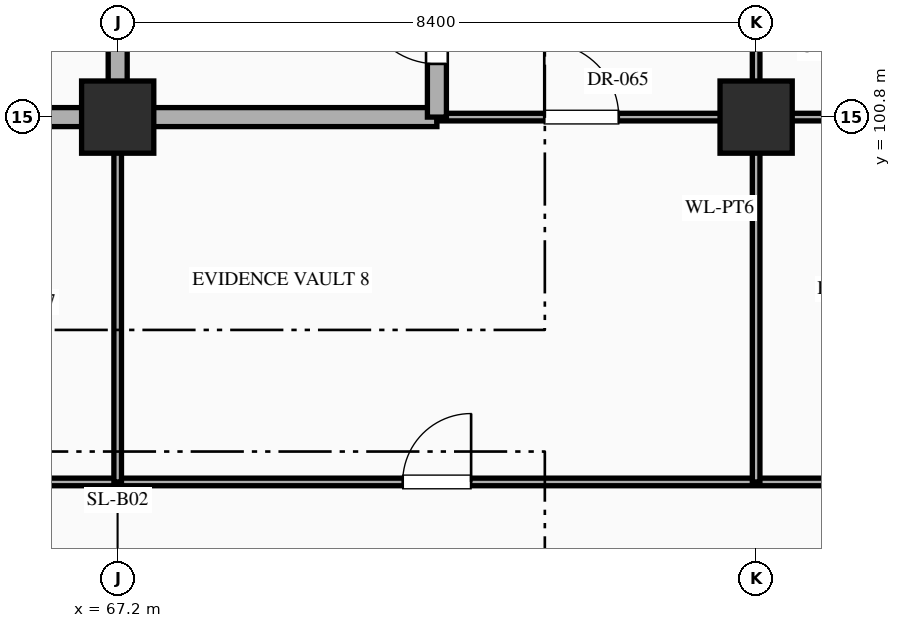
"""IFC4 building model, lengths in metres.
Left out: names, types, materials, properties, quantities, classifications, styles, units other than length and angle.
Written with IfcOpenShell. Run it as: python <this file> out.ifc"""

import sys

from ifc_helpers import new_model, si_unit, direction, frame, frame_2d, origin, origin_2d, place, context, subcontext, project, spatial, rectangle, extrude, element, fill, save


model = new_model("IFC4")
c1 = context("Model", 3, precision=1e-05, world=origin(), true_north=direction((0.0, 1.0)))
c2 = subcontext(c1, "Body", "Model", "MODEL_VIEW")
j1 = project(units=[si_unit("LENGTHUNIT", "METRE"), si_unit("PLANEANGLEUNIT", "RADIAN")], contexts=[c1])
p1 = place(None, origin())
s1 = spatial("IfcSite", under=j1, at=p1, CompositionType="ELEMENT")
p2 = place(p1, origin())
s2 = spatial("IfcBuilding", under=s1, at=p2, CompositionType="ELEMENT")
p3 = place(p2, frame((0.0, 0.0, -10.2)))
s3 = spatial("IfcBuildingStorey", under=s2, at=p3, CompositionType="ELEMENT", Elevation=-10.2)
for number, where, z_axis, x_axis in (
    (1, (67.2, 100.8, 0.0), (0.0, 0.0, 1.0), (1.0, 0.0, 0.0)),
    (2, (75.6, 100.8, 0.0), (0.0, 0.0, 1.0), (1.0, 0.0, 0.0)),
):
    element("IfcColumn", number, at=place(p3, frame(where, z_axis=z_axis, x_axis=x_axis)), inside=s3, PredefinedType="COLUMN", context=c2, shape_type="SweptSolid", body=[
        extrude(rectangle(XDim=0.95, YDim=0.95, at=origin_2d()), origin(), (0.0, 0.0, 1.0), 4.8),
    ])
p4 = place(p3, frame((0.04, 96.0, 0.0), z_axis=(0.0, 0.0, 1.0), x_axis=(1.0, 0.0, 0.0)))
e3 = element("IfcWall", 3, at=p4, inside=s3, PredefinedType="STANDARD", context=c2, shape_type="SweptSolid", body=[
    extrude(rectangle(XDim=151.16, YDim=0.1, at=frame_2d((75.58, 0.0))), origin(), (0.0, 0.0, 1.0), 4.48),
])
p5 = place(p4, frame((1.04, 0.0, 0.0)))
e4 = element("IfcOpeningElement", 4, at=p5, cuts=e3, PredefinedType="OPENING", context=c2, shape_type="SweptSolid", body=[
    extrude(rectangle(XDim=1.28, YDim=2.35, at=frame_2d((0.64, 1.175))), frame((0.0, 0.062, 0.0), z_axis=(0.0, -1.0, 0.0), x_axis=(1.0, 0.0, 0.0)), (0.0, 0.0, 1.0), 0.124),
])
p6 = place(p4, frame((4.09, 0.0, 0.0)))
e5 = element("IfcOpeningElement", 5, at=p6, cuts=e3, PredefinedType="OPENING", context=c2, shape_type="SweptSolid", body=[
    extrude(rectangle(XDim=0.94, YDim=2.3, at=frame_2d((0.47, 1.15))), frame((0.0, 0.062, 0.0), z_axis=(0.0, -1.0, 0.0), x_axis=(1.0, 0.0, 0.0)), (0.0, 0.0, 1.0), 0.124),
])
p7 = place(p4, frame((6.57, 0.0, 0.0)))
e6 = element("IfcOpeningElement", 6, at=p7, cuts=e3, PredefinedType="OPENING", context=c2, shape_type="SweptSolid", body=[
    extrude(rectangle(XDim=0.98, YDim=2.35, at=frame_2d((0.49, 1.175))), frame((0.0, 0.062, 0.0), z_axis=(0.0, -1.0, 0.0), x_axis=(1.0, 0.0, 0.0)), (0.0, 0.0, 1.0), 0.124),
])
p8 = place(p4, frame((12.05, 0.0, 0.0)))
e7 = element("IfcOpeningElement", 7, at=p8, cuts=e3, PredefinedType="OPENING", context=c2, shape_type="SweptSolid", body=[
    extrude(rectangle(XDim=1.02, YDim=2.4, at=frame_2d((0.51, 1.2))), frame((0.0, 0.062, 0.0), z_axis=(0.0, -1.0, 0.0), x_axis=(1.0, 0.0, 0.0)), (0.0, 0.0, 1.0), 0.124),
])
p9 = place(p4, frame((20.43, 0.0, 0.0)))
e8 = element("IfcOpeningElement", 8, at=p9, cuts=e3, PredefinedType="OPENING", context=c2, shape_type="SweptSolid", body=[
    extrude(rectangle(XDim=1.06, YDim=2.4, at=frame_2d((0.53, 1.2))), frame((0.0, 0.062, 0.0), z_axis=(0.0, -1.0, 0.0), x_axis=(1.0, 0.0, 0.0)), (0.0, 0.0, 1.0), 0.124),
])
p10 = place(p4, frame((26.29, 0.0, 0.0)))
e9 = element("IfcOpeningElement", 9, at=p10, cuts=e3, PredefinedType="OPENING", context=c2, shape_type="SweptSolid", body=[
    extrude(rectangle(XDim=1.14, YDim=2.4, at=frame_2d((0.57, 1.2))), frame((0.0, 0.062, 0.0), z_axis=(0.0, -1.0, 0.0), x_axis=(1.0, 0.0, 0.0)), (0.0, 0.0, 1.0), 0.124),
])
p11 = place(p4, frame((29.31, 0.0, 0.0)))
e10 = element("IfcOpeningElement", 10, at=p11, cuts=e3, PredefinedType="OPENING", context=c2, shape_type="SweptSolid", body=[
    extrude(rectangle(XDim=0.9, YDim=2.15, at=frame_2d((0.45, 1.075))), frame((0.0, 0.062, 0.0), z_axis=(0.0, -1.0, 0.0), x_axis=(1.0, 0.0, 0.0)), (0.0, 0.0, 1.0), 0.124),
])
p12 = place(p4, frame((31.83, 0.0, 0.0)))
e11 = element("IfcOpeningElement", 11, at=p12, cuts=e3, PredefinedType="OPENING", context=c2, shape_type="SweptSolid", body=[
    extrude(rectangle(XDim=0.86, YDim=2.1, at=frame_2d((0.43, 1.05))), frame((0.0, 0.062, 0.0), z_axis=(0.0, -1.0, 0.0), x_axis=(1.0, 0.0, 0.0)), (0.0, 0.0, 1.0), 0.124),
])
p13 = place(p4, frame((37.3, 0.0, 0.0)))
e12 = element("IfcOpeningElement", 12, at=p13, cuts=e3, PredefinedType="OPENING", context=c2, shape_type="SweptSolid", body=[
    extrude(rectangle(XDim=0.92, YDim=2.15, at=frame_2d((0.46, 1.075))), frame((0.0, 0.062, 0.0), z_axis=(0.0, -1.0, 0.0), x_axis=(1.0, 0.0, 0.0)), (0.0, 0.0, 1.0), 0.124),
])
p14 = place(p4, frame((45.68, 0.0, 0.0)))
e13 = element("IfcOpeningElement", 13, at=p14, cuts=e3, PredefinedType="OPENING", context=c2, shape_type="SweptSolid", body=[
    extrude(rectangle(XDim=0.96, YDim=2.2, at=frame_2d((0.48, 1.1))), frame((0.0, 0.062, 0.0), z_axis=(0.0, -1.0, 0.0), x_axis=(1.0, 0.0, 0.0)), (0.0, 0.0, 1.0), 0.124),
])
p15 = place(p4, frame((51.57, 0.0, 0.0)))
e14 = element("IfcOpeningElement", 14, at=p15, cuts=e3, PredefinedType="OPENING", context=c2, shape_type="SweptSolid", body=[
    extrude(rectangle(XDim=0.98, YDim=2.35, at=frame_2d((0.49, 1.175))), frame((0.0, 0.062, 0.0), z_axis=(0.0, -1.0, 0.0), x_axis=(1.0, 0.0, 0.0)), (0.0, 0.0, 1.0), 0.124),
])
p16 = place(p4, frame((54.45, 0.0, 0.0)))
e15 = element("IfcOpeningElement", 15, at=p16, cuts=e3, PredefinedType="OPENING", context=c2, shape_type="SweptSolid", body=[
    extrude(rectangle(XDim=1.02, YDim=2.4, at=frame_2d((0.51, 1.2))), frame((0.0, 0.062, 0.0), z_axis=(0.0, -1.0, 0.0), x_axis=(1.0, 0.0, 0.0)), (0.0, 0.0, 1.0), 0.124),
])
p17 = place(p4, frame((56.93, 0.0, 0.0)))
e16 = element("IfcOpeningElement", 16, at=p17, cuts=e3, PredefinedType="OPENING", context=c2, shape_type="SweptSolid", body=[
    extrude(rectangle(XDim=1.06, YDim=2.4, at=frame_2d((0.53, 1.2))), frame((0.0, 0.062, 0.0), z_axis=(0.0, -1.0, 0.0), x_axis=(1.0, 0.0, 0.0)), (0.0, 0.0, 1.0), 0.124),
])
p18 = place(p4, frame((62.39, 0.0, 0.0)))
e17 = element("IfcOpeningElement", 17, at=p18, cuts=e3, PredefinedType="OPENING", context=c2, shape_type="SweptSolid", body=[
    extrude(rectangle(XDim=1.14, YDim=2.4, at=frame_2d((0.57, 1.2))), frame((0.0, 0.062, 0.0), z_axis=(0.0, -1.0, 0.0), x_axis=(1.0, 0.0, 0.0)), (0.0, 0.0, 1.0), 0.124),
])
p19 = place(p4, frame((70.91, 0.0, 0.0)))
e18 = element("IfcOpeningElement", 18, at=p19, cuts=e3, PredefinedType="OPENING", context=c2, shape_type="SweptSolid", body=[
    extrude(rectangle(XDim=0.9, YDim=2.15, at=frame_2d((0.45, 1.075))), frame((0.0, 0.062, 0.0), z_axis=(0.0, -1.0, 0.0), x_axis=(1.0, 0.0, 0.0)), (0.0, 0.0, 1.0), 0.124),
])
p20 = place(p4, frame((79.33, 0.0, 0.0)))
e19 = element("IfcOpeningElement", 19, at=p20, cuts=e3, PredefinedType="OPENING", context=c2, shape_type="SweptSolid", body=[
    extrude(rectangle(XDim=0.86, YDim=2.1, at=frame_2d((0.43, 1.05))), frame((0.0, 0.062, 0.0), z_axis=(0.0, -1.0, 0.0), x_axis=(1.0, 0.0, 0.0)), (0.0, 0.0, 1.0), 0.124),
])
p21 = place(p4, frame((85.1, 0.0, 0.0)))
e20 = element("IfcOpeningElement", 20, at=p21, cuts=e3, PredefinedType="OPENING", context=c2, shape_type="SweptSolid", body=[
    extrude(rectangle(XDim=1.12, YDim=2.25, at=frame_2d((0.56, 1.125))), frame((0.0, 0.062, 0.0), z_axis=(0.0, -1.0, 0.0), x_axis=(1.0, 0.0, 0.0)), (0.0, 0.0, 1.0), 0.124),
])
p22 = place(p4, frame((87.98, 0.0, 0.0)))
e21 = element("IfcOpeningElement", 21, at=p22, cuts=e3, PredefinedType="OPENING", context=c2, shape_type="SweptSolid", body=[
    extrude(rectangle(XDim=1.16, YDim=2.3, at=frame_2d((0.58, 1.15))), frame((0.0, 0.062, 0.0), z_axis=(0.0, -1.0, 0.0), x_axis=(1.0, 0.0, 0.0)), (0.0, 0.0, 1.0), 0.124),
])
p23 = place(p4, frame((90.46, 0.0, 0.0)))
e22 = element("IfcOpeningElement", 22, at=p23, cuts=e3, PredefinedType="OPENING", context=c2, shape_type="SweptSolid", body=[
    extrude(rectangle(XDim=1.2, YDim=2.35, at=frame_2d((0.6, 1.175))), frame((0.0, 0.062, 0.0), z_axis=(0.0, -1.0, 0.0), x_axis=(1.0, 0.0, 0.0)), (0.0, 0.0, 1.0), 0.124),
])
p24 = place(p4, frame((95.94, 0.0, 0.0)))
e23 = element("IfcOpeningElement", 23, at=p24, cuts=e3, PredefinedType="OPENING", context=c2, shape_type="SweptSolid", body=[
    extrude(rectangle(XDim=1.24, YDim=2.3, at=frame_2d((0.62, 1.15))), frame((0.0, 0.062, 0.0), z_axis=(0.0, -1.0, 0.0), x_axis=(1.0, 0.0, 0.0)), (0.0, 0.0, 1.0), 0.124),
])
p25 = place(p4, frame((104.32, 0.0, 0.0)))
e24 = element("IfcOpeningElement", 24, at=p25, cuts=e3, PredefinedType="OPENING", context=c2, shape_type="SweptSolid", body=[
    extrude(rectangle(XDim=1.28, YDim=2.35, at=frame_2d((0.64, 1.175))), frame((0.0, 0.062, 0.0), z_axis=(0.0, -1.0, 0.0), x_axis=(1.0, 0.0, 0.0)), (0.0, 0.0, 1.0), 0.124),
])
p26 = place(p4, frame((110.39, 0.0, 0.0)))
e25 = element("IfcOpeningElement", 25, at=p26, cuts=e3, PredefinedType="OPENING", context=c2, shape_type="SweptSolid", body=[
    extrude(rectangle(XDim=0.94, YDim=2.3, at=frame_2d((0.47, 1.15))), frame((0.0, 0.062, 0.0), z_axis=(0.0, -1.0, 0.0), x_axis=(1.0, 0.0, 0.0)), (0.0, 0.0, 1.0), 0.124),
])
p27 = place(p4, frame((113.27, 0.0, 0.0)))
e26 = element("IfcOpeningElement", 26, at=p27, cuts=e3, PredefinedType="OPENING", context=c2, shape_type="SweptSolid", body=[
    extrude(rectangle(XDim=0.98, YDim=2.35, at=frame_2d((0.49, 1.175))), frame((0.0, 0.062, 0.0), z_axis=(0.0, -1.0, 0.0), x_axis=(1.0, 0.0, 0.0)), (0.0, 0.0, 1.0), 0.124),
])
p28 = place(p4, frame((115.75, 0.0, 0.0)))
e27 = element("IfcOpeningElement", 27, at=p28, cuts=e3, PredefinedType="OPENING", context=c2, shape_type="SweptSolid", body=[
    extrude(rectangle(XDim=1.02, YDim=2.4, at=frame_2d((0.51, 1.2))), frame((0.0, 0.062, 0.0), z_axis=(0.0, -1.0, 0.0), x_axis=(1.0, 0.0, 0.0)), (0.0, 0.0, 1.0), 0.124),
])
p29 = place(p4, frame((121.24, 0.0, 0.0)))
e28 = element("IfcOpeningElement", 28, at=p29, cuts=e3, PredefinedType="OPENING", context=c2, shape_type="SweptSolid", body=[
    extrude(rectangle(XDim=1.04, YDim=2.2, at=frame_2d((0.52, 1.1))), frame((0.0, 0.062, 0.0), z_axis=(0.0, -1.0, 0.0), x_axis=(1.0, 0.0, 0.0)), (0.0, 0.0, 1.0), 0.124),
])
p30 = place(p4, frame((129.62, 0.0, 0.0)))
e29 = element("IfcOpeningElement", 29, at=p30, cuts=e3, PredefinedType="OPENING", context=c2, shape_type="SweptSolid", body=[
    extrude(rectangle(XDim=1.08, YDim=2.25, at=frame_2d((0.54, 1.125))), frame((0.0, 0.062, 0.0), z_axis=(0.0, -1.0, 0.0), x_axis=(1.0, 0.0, 0.0)), (0.0, 0.0, 1.0), 0.124),
])
p31 = place(p4, frame((135.5, 0.0, 0.0)))
e30 = element("IfcOpeningElement", 30, at=p31, cuts=e3, PredefinedType="OPENING", context=c2, shape_type="SweptSolid", body=[
    extrude(rectangle(XDim=1.12, YDim=2.25, at=frame_2d((0.56, 1.125))), frame((0.0, 0.062, 0.0), z_axis=(0.0, -1.0, 0.0), x_axis=(1.0, 0.0, 0.0)), (0.0, 0.0, 1.0), 0.124),
])
p32 = place(p4, frame((138.38, 0.0, 0.0)))
e31 = element("IfcOpeningElement", 31, at=p32, cuts=e3, PredefinedType="OPENING", context=c2, shape_type="SweptSolid", body=[
    extrude(rectangle(XDim=1.16, YDim=2.3, at=frame_2d((0.58, 1.15))), frame((0.0, 0.062, 0.0), z_axis=(0.0, -1.0, 0.0), x_axis=(1.0, 0.0, 0.0)), (0.0, 0.0, 1.0), 0.124),
])
p33 = place(p4, frame((140.86, 0.0, 0.0)))
e32 = element("IfcOpeningElement", 32, at=p33, cuts=e3, PredefinedType="OPENING", context=c2, shape_type="SweptSolid", body=[
    extrude(rectangle(XDim=1.2, YDim=2.35, at=frame_2d((0.6, 1.175))), frame((0.0, 0.062, 0.0), z_axis=(0.0, -1.0, 0.0), x_axis=(1.0, 0.0, 0.0)), (0.0, 0.0, 1.0), 0.124),
])
p34 = place(p4, frame((146.34, 0.0, 0.0)))
e33 = element("IfcOpeningElement", 33, at=p34, cuts=e3, PredefinedType="OPENING", context=c2, shape_type="SweptSolid", body=[
    extrude(rectangle(XDim=1.24, YDim=2.3, at=frame_2d((0.62, 1.15))), frame((0.0, 0.062, 0.0), z_axis=(0.0, -1.0, 0.0), x_axis=(1.0, 0.0, 0.0)), (0.0, 0.0, 1.0), 0.124),
])
p35 = place(p3, frame((58.8, 100.8, 0.0), z_axis=(0.0, 0.0, 1.0), x_axis=(1.0, 0.0, 0.0)))
e34 = element("IfcWall", 34, at=p35, inside=s3, PredefinedType="STANDARD", context=c2, shape_type="SweptSolid", body=[
    extrude(rectangle(XDim=12.6, YDim=0.25, at=frame_2d((6.3, 0.0))), origin(), (0.0, 0.0, 1.0), 3.63),
])
p36 = place(p35, frame((3.7, 0.0, 0.0)))
e35 = element("IfcOpeningElement", 35, at=p36, cuts=e34, PredefinedType="OPENING", context=c2, shape_type="SweptSolid", body=[
    extrude(rectangle(XDim=1.0, YDim=2.2, at=frame_2d((0.5, 1.1))), frame((0.0, 0.137, 0.0), z_axis=(0.0, -1.0, 0.0), x_axis=(1.0, 0.0, 0.0)), (0.0, 0.0, 1.0), 0.274),
])
p37 = place(p3, frame((71.4, 100.8, 0.0), z_axis=(0.0, 0.0, 1.0), x_axis=(1.0, 0.0, 0.0)))
e36 = element("IfcWall", 36, at=p37, inside=s3, PredefinedType="STANDARD", context=c2, shape_type="SweptSolid", body=[
    extrude(rectangle(XDim=25.2, YDim=0.1, at=frame_2d((12.6, 0.0))), origin(), (0.0, 0.0, 1.0), 3.63),
])
p38 = place(p37, frame((1.413, 0.0, 0.0)))
e37 = element("IfcOpeningElement", 37, at=p38, cuts=e36, PredefinedType="OPENING", context=c2, shape_type="SweptSolid", body=[
    extrude(rectangle(XDim=0.98, YDim=2.35, at=frame_2d((0.49, 1.175))), frame((0.0, 0.062, 0.0), z_axis=(0.0, -1.0, 0.0), x_axis=(1.0, 0.0, 0.0)), (0.0, 0.0, 1.0), 0.124),
])
p39 = place(p37, frame((22.867, 0.0, 0.0)))
e38 = element("IfcOpeningElement", 38, at=p39, cuts=e36, PredefinedType="OPENING", context=c2, shape_type="SweptSolid", body=[
    extrude(rectangle(XDim=0.86, YDim=2.1, at=frame_2d((0.43, 1.05))), frame((0.0, 0.062, 0.0), z_axis=(0.0, -1.0, 0.0), x_axis=(1.0, 0.0, 0.0)), (0.0, 0.0, 1.0), 0.124),
])
p40 = place(p37, frame((7.84, 0.0, 0.0)))
e39 = element("IfcOpeningElement", 39, at=p40, cuts=e36, PredefinedType="OPENING", context=c2, shape_type="SweptSolid", body=[
    extrude(rectangle(XDim=1.12, YDim=2.25, at=frame_2d((0.56, 1.125))), frame((0.0, 0.062, 0.0), z_axis=(0.0, -1.0, 0.0), x_axis=(1.0, 0.0, 0.0)), (0.0, 0.0, 1.0), 0.124),
])
p41 = place(p37, frame((14.008, 0.0, 0.0)))
e40 = element("IfcOpeningElement", 40, at=p41, cuts=e36, PredefinedType="OPENING", context=c2, shape_type="SweptSolid", body=[
    extrude(rectangle(XDim=0.98, YDim=2.35, at=frame_2d((0.49, 1.175))), frame((0.0, 0.062, 0.0), z_axis=(0.0, -1.0, 0.0), x_axis=(1.0, 0.0, 0.0)), (0.0, 0.0, 1.0), 0.124),
])
p42 = place(p37, frame((16.69, 0.0, 0.0)))
e41 = element("IfcOpeningElement", 41, at=p42, cuts=e36, PredefinedType="OPENING", context=c2, shape_type="SweptSolid", body=[
    extrude(rectangle(XDim=1.02, YDim=2.4, at=frame_2d((0.51, 1.2))), frame((0.0, 0.062, 0.0), z_axis=(0.0, -1.0, 0.0), x_axis=(1.0, 0.0, 0.0)), (0.0, 0.0, 1.0), 0.124),
])
p43 = place(p37, frame((18.972, 0.0, 0.0)))
e42 = element("IfcOpeningElement", 42, at=p43, cuts=e36, PredefinedType="OPENING", context=c2, shape_type="SweptSolid", body=[
    extrude(rectangle(XDim=1.06, YDim=2.4, at=frame_2d((0.53, 1.2))), frame((0.0, 0.062, 0.0), z_axis=(0.0, -1.0, 0.0), x_axis=(1.0, 0.0, 0.0)), (0.0, 0.0, 1.0), 0.124),
])
p44 = place(p3, frame((67.2, 96.0, 0.0), z_axis=(0.0, 0.0, 1.0), x_axis=(0.0, 1.0, 0.0)))
e43 = element("IfcWall", 43, at=p44, inside=s3, PredefinedType="STANDARD", context=c2, shape_type="SweptSolid", body=[
    extrude(rectangle(XDim=4.8, YDim=0.1, at=frame_2d((2.4, 0.0))), origin(), (0.0, 0.0, 1.0), 3.73),
])
p45 = place(p3, frame((67.2, 100.8, 0.0), z_axis=(0.0, 0.0, 1.0), x_axis=(0.0, 1.0, 0.0)))
e44 = element("IfcWall", 44, at=p45, inside=s3, PredefinedType="STANDARD", context=c2, shape_type="SweptSolid", body=[
    extrude(rectangle(XDim=2.4, YDim=0.25, at=frame_2d((1.2, 0.0))), origin(), (0.0, 0.0, 1.0), 3.73),
])
p46 = place(p45, frame((0.923, 0.0, 0.0)))
e45 = element("IfcOpeningElement", 45, at=p46, cuts=e44, PredefinedType="OPENING", context=c2, shape_type="SweptSolid", body=[
    extrude(rectangle(XDim=0.95, YDim=2.15, at=frame_2d((0.475, 1.075))), frame((0.0, 0.137, 0.0), z_axis=(0.0, -1.0, 0.0), x_axis=(1.0, 0.0, 0.0)), (0.0, 0.0, 1.0), 0.274),
])
p47 = place(p3, frame((71.4, 100.8, 0.0), z_axis=(0.0, 0.0, 1.0), x_axis=(0.0, 1.0, 0.0)))
e46 = element("IfcWall", 46, at=p47, inside=s3, PredefinedType="STANDARD", context=c2, shape_type="SweptSolid", body=[
    extrude(rectangle(XDim=3.6, YDim=0.25, at=frame_2d((1.8, 0.0))), origin(), (0.0, 0.0, 1.0), 4.48),
])
p48 = place(p47, frame((0.7, 0.0, 0.0)))
e47 = element("IfcOpeningElement", 47, at=p48, cuts=e46, PredefinedType="OPENING", context=c2, shape_type="SweptSolid", body=[
    extrude(rectangle(XDim=1.0, YDim=2.2, at=frame_2d((0.5, 1.1))), frame((0.0, 0.137, 0.0), z_axis=(0.0, -1.0, 0.0), x_axis=(1.0, 0.0, 0.0)), (0.0, 0.0, 1.0), 0.274),
])
p49 = place(p3, frame((75.6, 96.0, 0.0), z_axis=(0.0, 0.0, 1.0), x_axis=(0.0, 1.0, 0.0)))
e48 = element("IfcWall", 48, at=p49, inside=s3, PredefinedType="STANDARD", context=c2, shape_type="SweptSolid", body=[
    extrude(rectangle(XDim=7.2, YDim=0.1, at=frame_2d((3.6, 0.0))), origin(), (0.0, 0.0, 1.0), 3.73),
])
p50 = place(p49, frame((5.728, 0.0, 0.0)))
e49 = element("IfcOpeningElement", 49, at=p50, cuts=e48, PredefinedType="OPENING", context=c2, shape_type="SweptSolid", body=[
    extrude(rectangle(XDim=0.94, YDim=2.3, at=frame_2d((0.47, 1.15))), frame((0.0, 0.062, 0.0), z_axis=(0.0, -1.0, 0.0), x_axis=(1.0, 0.0, 0.0)), (0.0, 0.0, 1.0), 0.124),
])
p51 = place(p48, origin())
e50 = element("IfcDoor", 50, at=p51, inside=s3, OperationType="SINGLE_SWING_RIGHT", PredefinedType="DOOR", context=c2, shape_type="SweptSolid", body=[
    extrude(rectangle(XDim=1.0, YDim=2.2, at=frame_2d((0.5, 1.1))), frame((0.0, 0.025, 0.0), z_axis=(0.0, -1.0, 0.0), x_axis=(1.0, 0.0, 0.0)), (0.0, 0.0, 1.0), 0.05),
])
fill(e47, e50)
p52 = place(p38, origin())
e51 = element("IfcDoor", 51, at=p52, inside=s3, OperationType="SINGLE_SWING_LEFT", PredefinedType="DOOR", context=c2, shape_type="SweptSolid", body=[
    extrude(rectangle(XDim=0.98, YDim=2.35, at=frame_2d((0.49, 1.175))), frame((0.0, 0.025, 0.0), z_axis=(0.0, -1.0, 0.0), x_axis=(1.0, 0.0, 0.0)), (0.0, 0.0, 1.0), 0.05),
])
fill(e37, e51)
p53 = place(p19, origin())
e52 = element("IfcDoor", 52, at=p53, inside=s3, OperationType="SINGLE_SWING_RIGHT", PredefinedType="DOOR", context=c2, shape_type="SweptSolid", body=[
    extrude(rectangle(XDim=0.9, YDim=2.15, at=frame_2d((0.45, 1.075))), frame((0.0, 0.025, 0.0), z_axis=(0.0, -1.0, 0.0), x_axis=(1.0, 0.0, 0.0)), (0.0, 0.0, 1.0), 0.05),
])
fill(e18, e52)
save(model, sys.argv[1])
